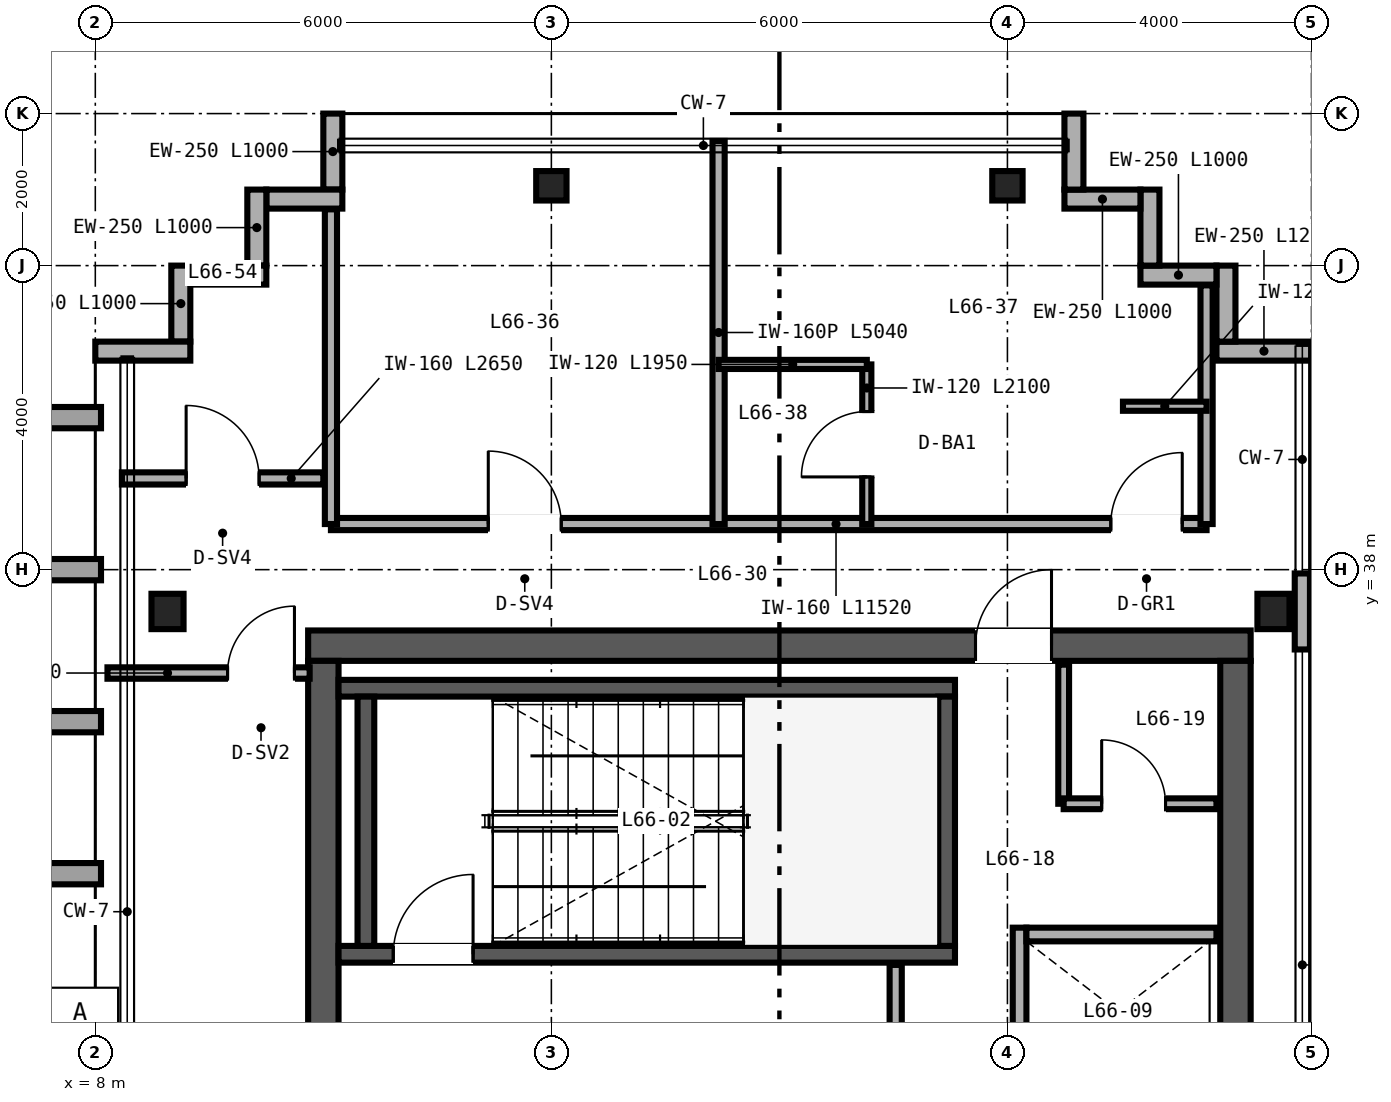
"""IFC4 building model, lengths in metres.
Left out: names, types, materials, properties, quantities, classifications, styles, units other than length and angle.
Written with IfcOpenShell. Run it as: python <this file> out.ifc"""

import sys

from ifc_helpers import new_model, si_unit, direction, frame, frame_2d, origin, origin_2d, place, context, subcontext, project, spatial, rectangle, i_section, extrude, source, transform, mapped, element, fill, save


model = new_model("IFC4")
c1 = context("Model", 3, precision=1e-05, world=origin(), true_north=direction((0.0, 1.0)))
c2 = subcontext(c1, "Body", "Model", "MODEL_VIEW")
j1 = project(units=[si_unit("LENGTHUNIT", "METRE"), si_unit("PLANEANGLEUNIT", "RADIAN")], contexts=[c1])
p1 = place(None, origin())
s1 = spatial("IfcSite", under=j1, at=p1, CompositionType="ELEMENT")
p2 = place(p1, origin())
s2 = spatial("IfcBuilding", under=s1, at=p2, CompositionType="ELEMENT")
p3 = place(p2, frame((0.0, 0.0, 261.6)))
s3 = spatial("IfcBuildingStorey", under=s2, at=p3, CompositionType="ELEMENT", Elevation=261.6)
p4 = place(p3, frame((10.8, 37.0, 0.0), z_axis=(0.0, 0.0, 1.0), x_axis=(1.0, 0.0, 0.0)))
e1 = element("IfcWall", 1, at=p4, inside=s3, PredefinedType="SHEAR", context=c2, shape_type="SweptSolid", body=[
    extrude(rectangle(XDim=12.4, YDim=0.4, at=frame_2d((6.2, 0.0))), origin(), (0.0, 0.0, 1.0), 3.38),
])
p5 = place(p4, frame((8.78, 0.0, 0.0)))
e2 = element("IfcOpeningElement", 2, at=p5, cuts=e1, PredefinedType="OPENING", context=c2, shape_type="SweptSolid", body=[
    extrude(rectangle(XDim=1.0, YDim=2.15, at=frame_2d((0.5, 1.075))), frame((0.0, 0.21, 0.0), z_axis=(0.0, -1.0, 0.0), x_axis=(1.0, 0.0, 0.0)), (0.0, 0.0, 1.0), 0.42),
])
for number, where, z_axis, x_axis in (
    (3, (11.0, 15.2, 0.0), (0.0, 0.0, 1.0), (0.0, 1.0, 0.0)),
    (4, (23.0, 15.2, 0.0), (0.0, 0.0, 1.0), (0.0, 1.0, 0.0)),
):
    element("IfcWall", number, at=place(p3, frame(where, z_axis=z_axis, x_axis=x_axis)), inside=s3, PredefinedType="SHEAR", context=c2, shape_type="SweptSolid", body=[
        extrude(rectangle(XDim=21.6, YDim=0.4, at=frame_2d((10.8, 0.0))), origin(), (0.0, 0.0, 1.0), 3.38),
    ])
p6 = place(p3, frame((11.2, 32.94, 0.0), z_axis=(0.0, 0.0, 1.0), x_axis=(1.0, 0.0, 0.0)))
e5 = element("IfcWall", 5, at=p6, inside=s3, PredefinedType="SHEAR", context=c2, shape_type="SweptSolid", body=[
    extrude(rectangle(XDim=8.11, YDim=0.22, at=frame_2d((4.055, 0.0))), origin(), (0.0, 0.0, 1.0), 3.4),
])
p7 = place(p6, frame((0.72, 0.0, 0.0)))
e6 = element("IfcOpeningElement", 6, at=p7, cuts=e5, PredefinedType="OPENING", context=c2, shape_type="SweptSolid", body=[
    extrude(rectangle(XDim=1.05, YDim=2.15, at=frame_2d((0.525, 1.075))), frame((0.0, 0.12, 0.0), z_axis=(0.0, -1.0, 0.0), x_axis=(1.0, 0.0, 0.0)), (0.0, 0.0, 1.0), 0.24),
])
p8 = place(p3, frame((11.2, 36.44, 0.0), z_axis=(0.0, 0.0, 1.0), x_axis=(1.0, 0.0, 0.0)))
e7 = element("IfcWall", 7, at=p8, inside=s3, PredefinedType="SHEAR", context=c2, shape_type="SweptSolid", body=[
    extrude(rectangle(XDim=8.11, YDim=0.22, at=frame_2d((4.055, 0.0))), origin(), (0.0, 0.0, 1.0), 3.4),
])
for number, where, z_axis, x_axis in (
    (8, (11.56, 33.05, 0.0), (0.0, 0.0, 1.0), (0.0, 1.0, 0.0)),
    (9, (19.2, 33.05, 0.0), (0.0, 0.0, 1.0), (0.0, 1.0, 0.0)),
):
    element("IfcWall", number, at=place(p3, frame(where, z_axis=z_axis, x_axis=x_axis)), inside=s3, PredefinedType="SHEAR", context=c2, shape_type="SweptSolid", body=[
        extrude(rectangle(XDim=3.28, YDim=0.22, at=frame_2d((1.64, 0.0))), origin(), (0.0, 0.0, 1.0), 3.4),
    ])
m1 = source(origin(), c2, "Body", "SweptSolid", [
    extrude(i_section(OverallWidth=0.422, OverallDepth=0.465, WebThickness=0.045, FlangeThickness=0.073, FilletRadius=0.025, at=origin_2d()), origin(), (0.0, 0.0, 1.0), 3.38),
])
for number, where, z_axis, x_axis in (
    (10, (8.95, 37.45, 0.0), (0.0, 0.0, 1.0), (1.0, 0.0, 0.0)),
    (11, (23.5, 37.45, 0.0), (0.0, 0.0, 1.0), (1.0, 0.0, 0.0)),
):
    element("IfcColumn", number, at=place(p3, frame(where, z_axis=z_axis, x_axis=x_axis)), inside=s3, PredefinedType="COLUMN", context=c2, shape_type="MappedRepresentation", body=[
        mapped(m1, transform((0.0, 0.0, 0.0), scale=1.0)),
    ])
m2 = source(origin(), c2, "Body", "SweptSolid", [
    extrude(i_section(OverallWidth=0.399, OverallDepth=0.387, WebThickness=0.021, FlangeThickness=0.033, FilletRadius=0.025, at=origin_2d()), origin(), (0.0, 0.0, 1.0), 3.38),
])
for number, where, z_axis, x_axis in (
    (12, (14.0, 43.05, 0.0), (0.0, 0.0, 1.0), (1.0, 0.0, 0.0)),
    (13, (20.0, 43.05, 0.0), (0.0, 0.0, 1.0), (1.0, 0.0, 0.0)),
):
    element("IfcColumn", number, at=place(p3, frame(where, z_axis=z_axis, x_axis=x_axis)), inside=s3, PredefinedType="COLUMN", context=c2, shape_type="MappedRepresentation", body=[
        mapped(m2, transform((0.0, 0.0, 0.0), scale=1.0)),
    ])
p9 = place(p3, frame((24.0, 40.875, 0.0), z_axis=(0.0, 0.0, 1.0), x_axis=(-1.0, 0.0, 0.0)))
e14 = element("IfcWall", 14, at=p9, inside=s3, PredefinedType="SOLIDWALL", context=c2, shape_type="SweptSolid", body=[
    extrude(rectangle(XDim=1.25, YDim=0.25, at=frame_2d((0.625, 0.0))), origin(), (0.0, 0.0, 1.0), 3.38),
])
for number, where, z_axis, x_axis in (
    (15, (22.875, 41.0, 0.0), (0.0, 0.0, 1.0), (0.0, 1.0, 0.0)),
    (16, (22.75, 41.875, 0.0), (0.0, 0.0, 1.0), (-1.0, 0.0, 0.0)),
    (17, (21.875, 42.0, 0.0), (0.0, 0.0, 1.0), (0.0, 1.0, 0.0)),
    (18, (21.75, 42.875, 0.0), (0.0, 0.0, 1.0), (-1.0, 0.0, 0.0)),
    (19, (20.875, 43.0, 0.0), (0.0, 0.0, 1.0), (0.0, 1.0, 0.0)),
    (20, (11.125, 44.0, 0.0), (0.0, 0.0, 1.0), (0.0, -1.0, 0.0)),
    (21, (11.25, 42.875, 0.0), (0.0, 0.0, 1.0), (-1.0, 0.0, 0.0)),
    (22, (10.125, 43.0, 0.0), (0.0, 0.0, 1.0), (0.0, -1.0, 0.0)),
    (23, (10.25, 41.875, 0.0), (0.0, 0.0, 1.0), (-1.0, 0.0, 0.0)),
    (24, (9.125, 42.0, 0.0), (0.0, 0.0, 1.0), (0.0, -1.0, 0.0)),
):
    element("IfcWall", number, at=place(p3, frame(where, z_axis=z_axis, x_axis=x_axis)), inside=s3, PredefinedType="SOLIDWALL", context=c2, shape_type="SweptSolid", body=[
        extrude(rectangle(XDim=1.0, YDim=0.25, at=frame_2d((0.5, 0.0))), origin(), (0.0, 0.0, 1.0), 3.38),
    ])
p10 = place(p3, frame((9.25, 40.875, 0.0), z_axis=(0.0, 0.0, 1.0), x_axis=(-1.0, 0.0, 0.0)))
e25 = element("IfcWall", 25, at=p10, inside=s3, PredefinedType="SOLIDWALL", context=c2, shape_type="SweptSolid", body=[
    extrude(rectangle(XDim=1.25, YDim=0.25, at=frame_2d((0.625, 0.0))), origin(), (0.0, 0.0, 1.0), 3.38),
])
p11 = place(p3, frame((23.88, 36.95, 0.0), z_axis=(0.0, 0.0, 1.0), x_axis=(0.0, 1.0, 0.0)))
e26 = element("IfcWall", 26, at=p11, inside=s3, PredefinedType="PARAPET", context=c2, shape_type="SweptSolid", body=[
    extrude(rectangle(XDim=1.0, YDim=0.2, at=frame_2d((0.5, 0.0))), origin(), (0.0, 0.0, 1.0), 3.38),
])
p12 = place(p3, frame((20.16, 29.0, 0.0), z_axis=(0.0, 0.0, 1.0), x_axis=(0.0, 1.0, 0.0)))
e27 = element("IfcWall", 27, at=p12, inside=s3, PredefinedType="SOLIDWALL", context=c2, shape_type="SweptSolid", body=[
    extrude(rectangle(XDim=4.29, YDim=0.18, at=frame_2d((2.145, 0.0))), origin(), (0.0, 0.0, 1.0), 3.38),
])
p13 = place(p3, frame((20.25, 33.2, 0.0), z_axis=(0.0, 0.0, 1.0), x_axis=(1.0, 0.0, 0.0)))
e28 = element("IfcWall", 28, at=p13, inside=s3, PredefinedType="SOLIDWALL", context=c2, shape_type="SweptSolid", body=[
    extrude(rectangle(XDim=2.5, YDim=0.18, at=frame_2d((1.25, 0.0))), origin(), (0.0, 0.0, 1.0), 3.38),
])
p14 = place(p3, frame((18.53, 28.9, 0.0), z_axis=(0.0, 0.0, 1.0), x_axis=(0.0, 1.0, 0.0)))
e29 = element("IfcWall", 29, at=p14, inside=s3, PredefinedType="PARTITIONING", context=c2, shape_type="SweptSolid", body=[
    extrude(rectangle(XDim=3.9, YDim=0.16, at=frame_2d((1.95, 0.0))), origin(), (0.0, 0.0, 1.0), 3.38),
])
p15 = place(p14, frame((1.5, 0.0, 0.0)))
e30 = element("IfcOpeningElement", 30, at=p15, cuts=e29, PredefinedType="OPENING", context=c2, shape_type="SweptSolid", body=[
    extrude(rectangle(XDim=1.0, YDim=2.15, at=frame_2d((0.5, 1.075))), frame((0.0, 0.09, 0.0), z_axis=(0.0, -1.0, 0.0), x_axis=(1.0, 0.0, 0.0)), (0.0, 0.0, 1.0), 0.18),
])
p16 = place(p3, frame((20.74, 34.92, 0.0), z_axis=(0.0, 0.0, 1.0), x_axis=(0.0, 1.0, 0.0)))
e31 = element("IfcWall", 31, at=p16, inside=s3, PredefinedType="PARTITIONING", context=c2, shape_type="SweptSolid", body=[
    extrude(rectangle(XDim=1.83, YDim=0.142, at=frame_2d((0.915, 0.0))), origin(), (0.0, 0.0, 1.0), 3.38),
])
p17 = place(p3, frame((20.74, 34.92, 0.0), z_axis=(0.0, 0.0, 1.0), x_axis=(1.0, 0.0, 0.0)))
e32 = element("IfcWall", 32, at=p17, inside=s3, PredefinedType="PARTITIONING", context=c2, shape_type="SweptSolid", body=[
    extrude(rectangle(XDim=2.01, YDim=0.142, at=frame_2d((1.005, 0.0))), origin(), (0.0, 0.0, 1.0), 3.38),
])
p18 = place(p17, frame((0.5, 0.0, 0.0)))
e33 = element("IfcOpeningElement", 33, at=p18, cuts=e32, PredefinedType="OPENING", context=c2, shape_type="SweptSolid", body=[
    extrude(rectangle(XDim=0.84, YDim=2.1, at=frame_2d((0.42, 1.05))), frame((0.0, 0.081, 0.0), z_axis=(0.0, -1.0, 0.0), x_axis=(1.0, 0.0, 0.0)), (0.0, 0.0, 1.0), 0.162),
])
p19 = place(p3, frame((11.1, 38.6, 0.0), z_axis=(0.0, 0.0, 1.0), x_axis=(1.0, 0.0, 0.0)))
e34 = element("IfcWall", 34, at=p19, inside=s3, PredefinedType="PARTITIONING", context=c2, shape_type="SweptSolid", body=[
    extrude(rectangle(XDim=11.52, YDim=0.16, at=frame_2d((5.76, 0.0))), origin(), (0.0, 0.0, 1.0), 3.38),
])
p20 = place(p19, frame((2.07, 0.0, 0.0)))
e35 = element("IfcOpeningElement", 35, at=p20, cuts=e34, PredefinedType="OPENING", context=c2, shape_type="SweptSolid", body=[
    extrude(rectangle(XDim=0.96, YDim=2.15, at=frame_2d((0.48, 1.075))), frame((0.0, 0.09, 0.0), z_axis=(0.0, -1.0, 0.0), x_axis=(1.0, 0.0, 0.0)), (0.0, 0.0, 1.0), 0.18),
])
p21 = place(p19, frame((10.26, 0.0, 0.0)))
e36 = element("IfcOpeningElement", 36, at=p21, cuts=e34, PredefinedType="OPENING", context=c2, shape_type="SweptSolid", body=[
    extrude(rectangle(XDim=0.94, YDim=2.15, at=frame_2d((0.47, 1.075))), frame((0.0, 0.09, 0.0), z_axis=(0.0, -1.0, 0.0), x_axis=(1.0, 0.0, 0.0)), (0.0, 0.0, 1.0), 0.18),
])
p22 = place(p3, frame((11.1, 38.6, 0.0), z_axis=(0.0, 0.0, 1.0), x_axis=(0.0, 1.0, 0.0)))
e37 = element("IfcWall", 37, at=p22, inside=s3, PredefinedType="PARTITIONING", context=c2, shape_type="SweptSolid", body=[
    extrude(rectangle(XDim=4.14, YDim=0.16, at=frame_2d((2.07, 0.0))), origin(), (0.0, 0.0, 1.0), 3.38),
])
p23 = place(p3, frame((22.62, 38.6, 0.0), z_axis=(0.0, 0.0, 1.0), x_axis=(0.0, 1.0, 0.0)))
e38 = element("IfcWall", 38, at=p23, inside=s3, PredefinedType="PARTITIONING", context=c2, shape_type="SweptSolid", body=[
    extrude(rectangle(XDim=3.14, YDim=0.16, at=frame_2d((1.57, 0.0))), origin(), (0.0, 0.0, 1.0), 3.38),
])
p24 = place(p3, frame((16.2, 38.6, 0.0), z_axis=(0.0, 0.0, 1.0), x_axis=(0.0, 1.0, 0.0)))
e39 = element("IfcWall", 39, at=p24, inside=s3, PredefinedType="PARTITIONING", context=c2, shape_type="SweptSolid", body=[
    extrude(rectangle(XDim=5.04, YDim=0.16, at=frame_2d((2.52, 0.0))), origin(), (0.0, 0.0, 1.0), 2.687),
])
p25 = place(p3, frame((18.15, 38.6, 0.0), z_axis=(0.0, 0.0, 1.0), x_axis=(0.0, 1.0, 0.0)))
e40 = element("IfcWall", 40, at=p25, inside=s3, PredefinedType="PARTITIONING", context=c2, shape_type="SweptSolid", body=[
    extrude(rectangle(XDim=2.1, YDim=0.12, at=frame_2d((1.05, 0.0))), origin(), (0.0, 0.0, 1.0), 3.38),
])
p26 = place(p25, frame((0.62, 0.0, 0.0)))
e41 = element("IfcOpeningElement", 41, at=p26, cuts=e40, PredefinedType="OPENING", context=c2, shape_type="SweptSolid", body=[
    extrude(rectangle(XDim=0.86, YDim=2.1, at=frame_2d((0.43, 1.05))), frame((0.0, 0.07, 0.0), z_axis=(0.0, -1.0, 0.0), x_axis=(1.0, 0.0, 0.0)), (0.0, 0.0, 1.0), 0.14),
])
p27 = place(p3, frame((16.2, 40.7, 0.0), z_axis=(0.0, 0.0, 1.0), x_axis=(1.0, 0.0, 0.0)))
e42 = element("IfcWall", 42, at=p27, inside=s3, PredefinedType="PARTITIONING", context=c2, shape_type="SweptSolid", body=[
    extrude(rectangle(XDim=1.95, YDim=0.12, at=frame_2d((0.975, 0.0))), origin(), (0.0, 0.0, 1.0), 3.38),
])
p28 = place(p3, frame((21.52, 40.15, 0.0), z_axis=(0.0, 0.0, 1.0), x_axis=(1.0, 0.0, 0.0)))
e43 = element("IfcWall", 43, at=p28, inside=s3, PredefinedType="PARTITIONING", context=c2, shape_type="SweptSolid", body=[
    extrude(rectangle(XDim=1.1, YDim=0.12, at=frame_2d((0.55, 0.0))), origin(), (0.0, 0.0, 1.0), 3.38),
])
p29 = place(p3, frame((8.16, 36.64, 0.0), z_axis=(0.0, 0.0, 1.0), x_axis=(1.0, 0.0, 0.0)))
e44 = element("IfcWall", 44, at=p29, inside=s3, PredefinedType="PARTITIONING", context=c2, shape_type="SweptSolid", body=[
    extrude(rectangle(XDim=2.66, YDim=0.15, at=frame_2d((1.33, 0.0))), origin(), (0.0, 0.0, 1.0), 2.763),
])
p30 = place(p29, frame((1.58, 0.0, 0.0)))
e45 = element("IfcOpeningElement", 45, at=p30, cuts=e44, PredefinedType="OPENING", context=c2, shape_type="SweptSolid", body=[
    extrude(rectangle(XDim=0.88, YDim=2.15, at=frame_2d((0.44, 1.075))), frame((0.0, 0.085, 0.0), z_axis=(0.0, -1.0, 0.0), x_axis=(1.0, 0.0, 0.0)), (0.0, 0.0, 1.0), 0.17),
])
p31 = place(p3, frame((8.35, 39.2, 0.0), z_axis=(0.0, 0.0, 1.0), x_axis=(1.0, 0.0, 0.0)))
e46 = element("IfcWall", 46, at=p31, inside=s3, PredefinedType="PARTITIONING", context=c2, shape_type="SweptSolid", body=[
    extrude(rectangle(XDim=2.65, YDim=0.16, at=frame_2d((1.325, 0.0))), origin(), (0.0, 0.0, 1.0), 3.38),
])
p32 = place(p31, frame((0.845, 0.0, 0.0)))
e47 = element("IfcOpeningElement", 47, at=p32, cuts=e46, PredefinedType="OPENING", context=c2, shape_type="SweptSolid", body=[
    extrude(rectangle(XDim=0.96, YDim=2.15, at=frame_2d((0.48, 1.075))), frame((0.0, 0.09, 0.0), z_axis=(0.0, -1.0, 0.0), x_axis=(1.0, 0.0, 0.0)), (0.0, 0.0, 1.0), 0.18),
])
m3 = source(origin(), c2, "Body", "SweptSolid", [
    extrude(rectangle(XDim=1.05, YDim=2.15, at=frame_2d((0.525, 1.075))), frame((0.0, 0.025, 0.0), z_axis=(0.0, -1.0, 0.0), x_axis=(1.0, 0.0, 0.0)), (0.0, 0.0, 1.0), 0.05),
])
p33 = place(p7, origin())
e48 = element("IfcDoor", 48, at=p33, inside=s3, OperationType="SINGLE_SWING_RIGHT", PredefinedType="DOOR", context=c2, shape_type="MappedRepresentation", body=[
    mapped(m3, transform((0.0, 0.0, 0.0), scale=1.0)),
])
fill(e6, e48)
m4 = source(origin(), c2, "Body", "SweptSolid", [
    extrude(rectangle(XDim=0.84, YDim=2.1, at=frame_2d((0.42, 1.05))), frame((0.0, 0.025, 0.0), z_axis=(0.0, -1.0, 0.0), x_axis=(1.0, 0.0, 0.0)), (0.0, 0.0, 1.0), 0.05),
])
p34 = place(p18, origin())
e49 = element("IfcDoor", 49, at=p34, inside=s3, OperationType="SINGLE_SWING_LEFT", PredefinedType="DOOR", context=c2, shape_type="MappedRepresentation", body=[
    mapped(m4, transform((0.0, 0.0, 0.0), scale=1.0)),
])
fill(e33, e49)
m5 = source(origin(), c2, "Body", "SweptSolid", [
    extrude(rectangle(XDim=1.0, YDim=2.15, at=frame_2d((0.5, 1.075))), frame((0.0, 0.025, 0.0), z_axis=(0.0, -1.0, 0.0), x_axis=(1.0, 0.0, 0.0)), (0.0, 0.0, 1.0), 0.05),
])
p35 = place(p5, origin())
e50 = element("IfcDoor", 50, at=p35, inside=s3, OperationType="SINGLE_SWING_RIGHT", PredefinedType="DOOR", context=c2, shape_type="MappedRepresentation", body=[
    mapped(m5, transform((0.0, 0.0, 0.0), scale=1.0)),
])
fill(e2, e50)
m6 = source(origin(), c2, "Body", "SweptSolid", [
    extrude(rectangle(XDim=0.86, YDim=2.1, at=frame_2d((0.43, 1.05))), frame((0.0, 0.025, 0.0), z_axis=(0.0, -1.0, 0.0), x_axis=(1.0, 0.0, 0.0)), (0.0, 0.0, 1.0), 0.05),
])
p36 = place(p26, origin())
e51 = element("IfcDoor", 51, at=p36, inside=s3, OperationType="SINGLE_SWING_LEFT", PredefinedType="DOOR", context=c2, shape_type="MappedRepresentation", body=[
    mapped(m6, transform((0.0, 0.0, 0.0), scale=1.0)),
])
fill(e41, e51)
m7 = source(origin(), c2, "Body", "SweptSolid", [
    extrude(rectangle(XDim=0.96, YDim=2.15, at=frame_2d((0.48, 1.075))), frame((0.0, 0.025, 0.0), z_axis=(0.0, -1.0, 0.0), x_axis=(1.0, 0.0, 0.0)), (0.0, 0.0, 1.0), 0.05),
])
p37 = place(p20, origin())
e52 = element("IfcDoor", 52, at=p37, inside=s3, OperationType="SINGLE_SWING_LEFT", PredefinedType="DOOR", context=c2, shape_type="MappedRepresentation", body=[
    mapped(m7, transform((0.0, 0.0, 0.0), scale=1.0)),
])
fill(e35, e52)
m8 = source(origin(), c2, "Body", "SweptSolid", [
    extrude(rectangle(XDim=0.94, YDim=2.15, at=frame_2d((0.47, 1.075))), frame((0.0, 0.025, 0.0), z_axis=(0.0, -1.0, 0.0), x_axis=(1.0, 0.0, 0.0)), (0.0, 0.0, 1.0), 0.05),
])
p38 = place(p21, origin())
e53 = element("IfcDoor", 53, at=p38, inside=s3, OperationType="SINGLE_SWING_RIGHT", PredefinedType="DOOR", context=c2, shape_type="MappedRepresentation", body=[
    mapped(m8, transform((0.0, 0.0, 0.0), scale=1.0)),
])
fill(e36, e53)
m9 = source(origin(), c2, "Body", "SweptSolid", [
    extrude(rectangle(XDim=0.88, YDim=2.15, at=frame_2d((0.44, 1.075))), frame((0.0, 0.025, 0.0), z_axis=(0.0, -1.0, 0.0), x_axis=(1.0, 0.0, 0.0)), (0.0, 0.0, 1.0), 0.05),
])
p39 = place(p30, origin())
e54 = element("IfcDoor", 54, at=p39, inside=s3, OperationType="SINGLE_SWING_RIGHT", PredefinedType="DOOR", context=c2, shape_type="MappedRepresentation", body=[
    mapped(m9, transform((0.0, 0.0, 0.0), scale=1.0)),
])
fill(e45, e54)
p40 = place(p32, origin())
e55 = element("IfcDoor", 55, at=p40, inside=s3, OperationType="SINGLE_SWING_LEFT", PredefinedType="DOOR", context=c2, shape_type="MappedRepresentation", body=[
    mapped(m7, transform((0.0, 0.0, 0.0), scale=1.0)),
])
fill(e47, e55)
save(model, sys.argv[1])
